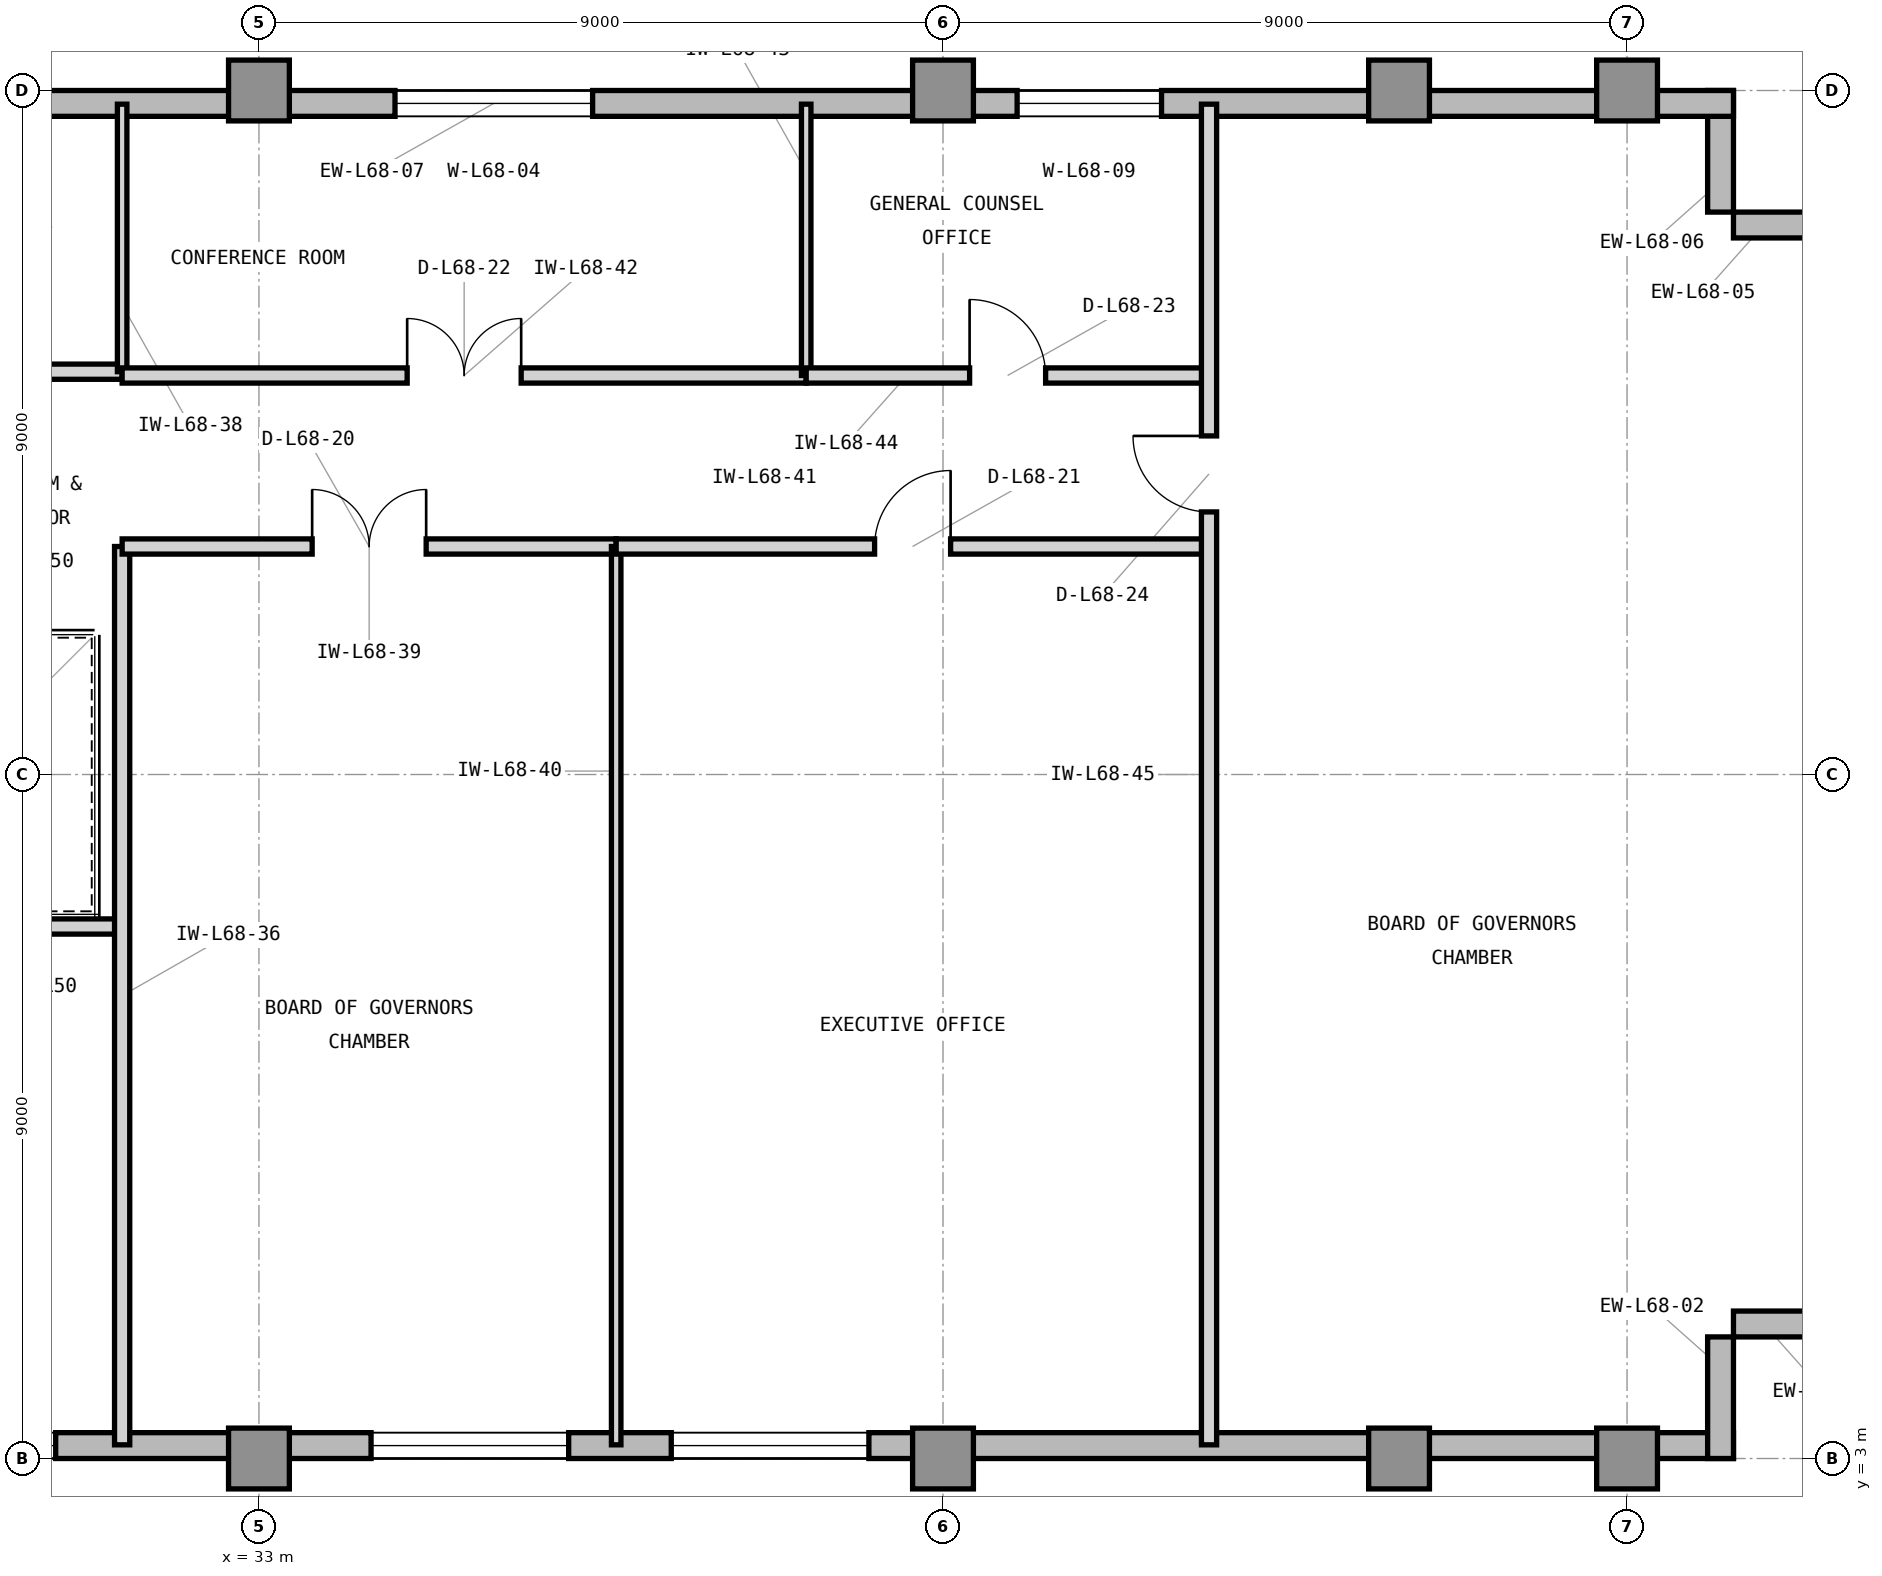
"""IFC4 building model, lengths in metres.
Left out: names, types, materials, properties, quantities, classifications, styles, units other than length and angle.
Written with IfcOpenShell. Run it as: python <this file> out.ifc"""

import sys

from ifc_helpers import new_model, si_unit, direction, frame, frame_2d, origin, origin_2d, place, context, subcontext, project, spatial, rectangle, extrude, element, fill, save


model = new_model("IFC4")
c1 = context("Model", 3, precision=1e-05, world=origin(), true_north=direction((0.0, 1.0)))
c2 = subcontext(c1, "Body", "Model", "MODEL_VIEW")
j1 = project(units=[si_unit("LENGTHUNIT", "METRE"), si_unit("PLANEANGLEUNIT", "RADIAN")], contexts=[c1])
p1 = place(None, origin())
s1 = spatial("IfcSite", under=j1, at=p1, CompositionType="ELEMENT")
p2 = place(p1, origin())
s2 = spatial("IfcBuilding", under=s1, at=p2, CompositionType="ELEMENT")
p3 = place(p2, frame((0.0, 0.0, 278.1)))
s3 = spatial("IfcBuildingStorey", under=s2, at=p3, CompositionType="ELEMENT", Elevation=278.1)
for number, where, z_axis, x_axis in (
    (1, (33.0, 3.0, 0.0), (0.0, 0.0, 1.0), (1.0, 0.0, 0.0)),
    (2, (33.0, 21.0, 0.0), (0.0, 0.0, 1.0), (1.0, 0.0, 0.0)),
    (3, (42.0, 3.0, 0.0), (0.0, 0.0, 1.0), (1.0, 0.0, 0.0)),
    (4, (42.0, 21.0, 0.0), (0.0, 0.0, 1.0), (1.0, 0.0, 0.0)),
    (5, (48.0, 3.0, 0.0), (0.0, 0.0, 1.0), (1.0, 0.0, 0.0)),
    (6, (48.0, 21.0, 0.0), (0.0, 0.0, 1.0), (1.0, 0.0, 0.0)),
    (7, (51.0, 3.0, 0.0), (0.0, 0.0, 1.0), (1.0, 0.0, 0.0)),
    (8, (51.0, 21.0, 0.0), (0.0, 0.0, 1.0), (1.0, 0.0, 0.0)),
):
    element("IfcColumn", number, at=place(p3, frame(where, z_axis=z_axis, x_axis=x_axis)), inside=s3, PredefinedType="COLUMN", context=c2, shape_type="SweptSolid", body=[
        extrude(rectangle(XDim=0.8, YDim=0.8, at=origin_2d()), origin(), (0.0, 0.0, 1.0), 3.9),
    ])
p4 = place(p3, frame((23.9, 3.17, 0.0), z_axis=(0.0, 0.0, 1.0), x_axis=(1.0, 0.0, 0.0)))
e9 = element("IfcWall", 9, at=p4, inside=s3, PredefinedType="STANDARD", context=c2, shape_type="SweptSolid", body=[
    extrude(rectangle(XDim=28.5, YDim=0.34, at=frame_2d((14.25, 0.0))), origin(), (0.0, 0.0, 1.0), 3.715),
])
p5 = place(p4, frame((10.575, 0.0, 0.8)))
e10 = element("IfcOpeningElement", 10, at=p5, cuts=e9, PredefinedType="OPENING", context=c2, shape_type="SweptSolid", body=[
    extrude(rectangle(XDim=2.6, YDim=2.35, at=frame_2d((1.3, 1.175))), frame((0.0, 0.18, 0.0), z_axis=(0.0, -1.0, 0.0), x_axis=(1.0, 0.0, 0.0)), (0.0, 0.0, 1.0), 0.36),
])
p6 = place(p4, frame((1.1, 0.0, 0.8)))
e11 = element("IfcOpeningElement", 11, at=p6, cuts=e9, PredefinedType="OPENING", context=c2, shape_type="SweptSolid", body=[
    extrude(rectangle(XDim=1.2, YDim=2.35, at=frame_2d((0.6, 1.175))), frame((0.0, 0.18, 0.0), z_axis=(0.0, -1.0, 0.0), x_axis=(1.0, 0.0, 0.0)), (0.0, 0.0, 1.0), 0.36),
])
p7 = place(p4, frame((3.826, 0.0, 0.8)))
e12 = element("IfcOpeningElement", 12, at=p7, cuts=e9, PredefinedType="OPENING", context=c2, shape_type="SweptSolid", body=[
    extrude(rectangle(XDim=2.6, YDim=2.35, at=frame_2d((1.3, 1.175))), frame((0.0, 0.18, 0.0), z_axis=(0.0, -1.0, 0.0), x_axis=(1.0, 0.0, 0.0)), (0.0, 0.0, 1.0), 0.36),
])
p8 = place(p4, frame((14.525, 0.0, 0.8)))
e13 = element("IfcOpeningElement", 13, at=p8, cuts=e9, PredefinedType="OPENING", context=c2, shape_type="SweptSolid", body=[
    extrude(rectangle(XDim=2.6, YDim=2.35, at=frame_2d((1.3, 1.175))), frame((0.0, 0.18, 0.0), z_axis=(0.0, -1.0, 0.0), x_axis=(1.0, 0.0, 0.0)), (0.0, 0.0, 1.0), 0.36),
])
for number, where, z_axis, x_axis in (
    (14, (52.23, 3.0, 0.0), (0.0, 0.0, 1.0), (0.0, 1.0, 0.0)),
    (15, (52.4, 4.77, 0.0), (0.0, 0.0, 1.0), (1.0, 0.0, 0.0)),
    (16, (54.0, 19.23, 0.0), (0.0, 0.0, 1.0), (-1.0, 0.0, 0.0)),
    (17, (52.23, 19.4, 0.0), (0.0, 0.0, 1.0), (0.0, 1.0, 0.0)),
):
    element("IfcWall", number, at=place(p3, frame(where, z_axis=z_axis, x_axis=x_axis)), inside=s3, PredefinedType="STANDARD", context=c2, shape_type="SweptSolid", body=[
        extrude(rectangle(XDim=1.6, YDim=0.34, at=frame_2d((0.8, 0.0))), origin(), (0.0, 0.0, 1.0), 3.715),
    ])
p9 = place(p3, frame((52.4, 20.83, 0.0), z_axis=(0.0, 0.0, 1.0), x_axis=(-1.0, 0.0, 0.0)))
e18 = element("IfcWall", 18, at=p9, inside=s3, PredefinedType="STANDARD", context=c2, shape_type="SweptSolid", body=[
    extrude(rectangle(XDim=32.62, YDim=0.34, at=frame_2d((16.31, 0.0))), origin(), (0.0, 0.0, 1.0), 3.715),
])
p10 = place(p9, frame((15.01, 0.0, 0.8)))
e19 = element("IfcOpeningElement", 19, at=p10, cuts=e18, PredefinedType="OPENING", context=c2, shape_type="SweptSolid", body=[
    extrude(rectangle(XDim=2.6, YDim=2.35, at=frame_2d((1.3, 1.175))), frame((0.0, 0.18, 0.0), z_axis=(0.0, -1.0, 0.0), x_axis=(1.0, 0.0, 0.0)), (0.0, 0.0, 1.0), 0.36),
])
p11 = place(p9, frame((24.33, 0.0, 0.8)))
e20 = element("IfcOpeningElement", 20, at=p11, cuts=e18, PredefinedType="OPENING", context=c2, shape_type="SweptSolid", body=[
    extrude(rectangle(XDim=2.6, YDim=2.35, at=frame_2d((1.3, 1.175))), frame((0.0, 0.18, 0.0), z_axis=(0.0, -1.0, 0.0), x_axis=(1.0, 0.0, 0.0)), (0.0, 0.0, 1.0), 0.36),
])
p12 = place(p9, frame((7.525, 0.0, 0.8)))
e21 = element("IfcOpeningElement", 21, at=p12, cuts=e18, PredefinedType="OPENING", context=c2, shape_type="SweptSolid", body=[
    extrude(rectangle(XDim=1.9, YDim=2.35, at=frame_2d((0.95, 1.175))), frame((0.0, 0.18, 0.0), z_axis=(0.0, -1.0, 0.0), x_axis=(1.0, 0.0, 0.0)), (0.0, 0.0, 1.0), 0.36),
])
p13 = place(p3, frame((26.9, 10.0, 0.0), z_axis=(0.0, 0.0, 1.0), x_axis=(1.0, 0.0, 0.0)))
e22 = element("IfcWall", 22, at=p13, inside=s3, PredefinedType="PARTITIONING", context=c2, shape_type="SweptSolid", body=[
    extrude(rectangle(XDim=4.3, YDim=0.2, at=frame_2d((2.15, 0.0))), origin(), (0.0, 0.0, 1.0), 3.705),
])
p14 = place(p3, frame((31.2, 3.18, 0.0), z_axis=(0.0, 0.0, 1.0), x_axis=(0.0, 1.0, 0.0)))
e23 = element("IfcWall", 23, at=p14, inside=s3, PredefinedType="PARTITIONING", context=c2, shape_type="SweptSolid", body=[
    extrude(rectangle(XDim=11.82, YDim=0.2, at=frame_2d((5.91, 0.0))), origin(), (0.0, 0.0, 1.0), 3.705),
])
p15 = place(p3, frame((23.85, 17.3, 0.0), z_axis=(0.0, 0.0, 1.0), x_axis=(1.0, 0.0, 0.0)))
e24 = element("IfcWall", 24, at=p15, inside=s3, PredefinedType="PARTITIONING", context=c2, shape_type="SweptSolid", body=[
    extrude(rectangle(XDim=7.35, YDim=0.2, at=frame_2d((3.675, 0.0))), origin(), (0.0, 0.0, 1.0), 3.705),
])
p16 = place(p15, frame((2.8, 0.0, 0.0)))
e25 = element("IfcOpeningElement", 25, at=p16, cuts=e24, PredefinedType="OPENING", context=c2, shape_type="SweptSolid", body=[
    extrude(rectangle(XDim=1.0, YDim=2.15, at=frame_2d((0.5, 1.075))), frame((0.0, 0.11, 0.0), z_axis=(0.0, -1.0, 0.0), x_axis=(1.0, 0.0, 0.0)), (0.0, 0.0, 1.0), 0.22),
])
p17 = place(p3, frame((31.2, 17.3, 0.0), z_axis=(0.0, 0.0, 1.0), x_axis=(0.0, 1.0, 0.0)))
e26 = element("IfcWall", 26, at=p17, inside=s3, PredefinedType="PARTITIONING", context=c2, shape_type="SweptSolid", body=[
    extrude(rectangle(XDim=3.52, YDim=0.125, at=frame_2d((1.76, 0.0))), origin(), (0.0, 0.0, 1.0), 3.705),
])
p18 = place(p3, frame((31.2, 15.0, 0.0), z_axis=(0.0, 0.0, 1.0), x_axis=(1.0, 0.0, 0.0)))
e27 = element("IfcWall", 27, at=p18, inside=s3, PredefinedType="PARTITIONING", context=c2, shape_type="SweptSolid", body=[
    extrude(rectangle(XDim=6.5, YDim=0.2, at=frame_2d((3.25, 0.0))), origin(), (0.0, 0.0, 1.0), 3.301),
])
p19 = place(p18, frame((2.5, 0.0, 0.0)))
e28 = element("IfcOpeningElement", 28, at=p19, cuts=e27, PredefinedType="OPENING", context=c2, shape_type="SweptSolid", body=[
    extrude(rectangle(XDim=1.5, YDim=2.3, at=frame_2d((0.75, 1.15))), frame((0.0, 0.11, 0.0), z_axis=(0.0, -1.0, 0.0), x_axis=(1.0, 0.0, 0.0)), (0.0, 0.0, 1.0), 0.22),
])
p20 = place(p3, frame((37.7, 3.18, 0.0), z_axis=(0.0, 0.0, 1.0), x_axis=(0.0, 1.0, 0.0)))
e29 = element("IfcWall", 29, at=p20, inside=s3, PredefinedType="PARTITIONING", context=c2, shape_type="SweptSolid", body=[
    extrude(rectangle(XDim=11.82, YDim=0.125, at=frame_2d((5.91, 0.0))), origin(), (0.0, 0.0, 1.0), 3.705),
])
p21 = place(p3, frame((37.7, 15.0, 0.0), z_axis=(0.0, 0.0, 1.0), x_axis=(1.0, 0.0, 0.0)))
e30 = element("IfcWall", 30, at=p21, inside=s3, PredefinedType="PARTITIONING", context=c2, shape_type="SweptSolid", body=[
    extrude(rectangle(XDim=7.8, YDim=0.2, at=frame_2d((3.9, 0.0))), origin(), (0.0, 0.0, 1.0), 3.301),
])
p22 = place(p21, frame((3.4, 0.0, 0.0)))
e31 = element("IfcOpeningElement", 31, at=p22, cuts=e30, PredefinedType="OPENING", context=c2, shape_type="SweptSolid", body=[
    extrude(rectangle(XDim=1.0, YDim=2.15, at=frame_2d((0.5, 1.075))), frame((0.0, 0.11, 0.0), z_axis=(0.0, -1.0, 0.0), x_axis=(1.0, 0.0, 0.0)), (0.0, 0.0, 1.0), 0.22),
])
p23 = place(p3, frame((31.2, 17.25, 0.0), z_axis=(0.0, 0.0, 1.0), x_axis=(1.0, 0.0, 0.0)))
e32 = element("IfcWall", 32, at=p23, inside=s3, PredefinedType="PARTITIONING", context=c2, shape_type="SweptSolid", body=[
    extrude(rectangle(XDim=9.0, YDim=0.2, at=frame_2d((4.5, 0.0))), origin(), (0.0, 0.0, 1.0), 3.705),
])
p24 = place(p23, frame((3.75, 0.0, 0.0)))
e33 = element("IfcOpeningElement", 33, at=p24, cuts=e32, PredefinedType="OPENING", context=c2, shape_type="SweptSolid", body=[
    extrude(rectangle(XDim=1.5, YDim=2.3, at=frame_2d((0.75, 1.15))), frame((0.0, 0.11, 0.0), z_axis=(0.0, -1.0, 0.0), x_axis=(1.0, 0.0, 0.0)), (0.0, 0.0, 1.0), 0.22),
])
p25 = place(p3, frame((40.2, 17.25, 0.0), z_axis=(0.0, 0.0, 1.0), x_axis=(0.0, 1.0, 0.0)))
e34 = element("IfcWall", 34, at=p25, inside=s3, PredefinedType="PARTITIONING", context=c2, shape_type="SweptSolid", body=[
    extrude(rectangle(XDim=3.57, YDim=0.125, at=frame_2d((1.785, 0.0))), origin(), (0.0, 0.0, 1.0), 3.705),
])
p26 = place(p3, frame((40.2, 17.25, 0.0), z_axis=(0.0, 0.0, 1.0), x_axis=(1.0, 0.0, 0.0)))
e35 = element("IfcWall", 35, at=p26, inside=s3, PredefinedType="PARTITIONING", context=c2, shape_type="SweptSolid", body=[
    extrude(rectangle(XDim=5.3, YDim=0.2, at=frame_2d((2.65, 0.0))), origin(), (0.0, 0.0, 1.0), 3.705),
])
p27 = place(p26, frame((2.15, 0.0, 0.0)))
e36 = element("IfcOpeningElement", 36, at=p27, cuts=e35, PredefinedType="OPENING", context=c2, shape_type="SweptSolid", body=[
    extrude(rectangle(XDim=1.0, YDim=2.15, at=frame_2d((0.5, 1.075))), frame((0.0, 0.11, 0.0), z_axis=(0.0, -1.0, 0.0), x_axis=(1.0, 0.0, 0.0)), (0.0, 0.0, 1.0), 0.22),
])
p28 = place(p3, frame((45.5, 3.18, 0.0), z_axis=(0.0, 0.0, 1.0), x_axis=(0.0, 1.0, 0.0)))
e37 = element("IfcWall", 37, at=p28, inside=s3, PredefinedType="PARTITIONING", context=c2, shape_type="SweptSolid", body=[
    extrude(rectangle(XDim=17.64, YDim=0.2, at=frame_2d((8.82, 0.0))), origin(), (0.0, 0.0, 1.0), 3.705),
])
p29 = place(p28, frame((12.275, 0.0, 0.0)))
e38 = element("IfcOpeningElement", 38, at=p29, cuts=e37, PredefinedType="OPENING", context=c2, shape_type="SweptSolid", body=[
    extrude(rectangle(XDim=1.0, YDim=2.15, at=frame_2d((0.5, 1.075))), frame((0.0, 0.11, 0.0), z_axis=(0.0, -1.0, 0.0), x_axis=(1.0, 0.0, 0.0)), (0.0, 0.0, 1.0), 0.22),
])
p30 = place(p5, origin())
e39 = element("IfcWindow", 39, at=p30, inside=s3, PartitioningType="SINGLE_PANEL", PredefinedType="WINDOW", context=c2, shape_type="SweptSolid", body=[
    extrude(rectangle(XDim=2.6, YDim=2.35, at=frame_2d((1.3, 1.175))), frame((0.0, 0.11, 0.0), z_axis=(0.0, -1.0, 0.0), x_axis=(1.0, 0.0, 0.0)), (0.0, 0.0, 1.0), 0.06),
])
fill(e10, e39)
p31 = place(p10, origin())
e40 = element("IfcWindow", 40, at=p31, inside=s3, PartitioningType="SINGLE_PANEL", PredefinedType="WINDOW", context=c2, shape_type="SweptSolid", body=[
    extrude(rectangle(XDim=2.6, YDim=2.35, at=frame_2d((1.3, 1.175))), frame((0.0, 0.11, 0.0), z_axis=(0.0, -1.0, 0.0), x_axis=(1.0, 0.0, 0.0)), (0.0, 0.0, 1.0), 0.06),
])
fill(e19, e40)
p32 = place(p19, origin())
e41 = element("IfcDoor", 41, at=p32, inside=s3, OperationType="DOUBLE_DOOR_SINGLE_SWING", PredefinedType="DOOR", context=c2, shape_type="SweptSolid", body=[
    extrude(rectangle(XDim=1.5, YDim=2.3, at=frame_2d((0.75, 1.15))), frame((0.0, 0.025, 0.0), z_axis=(0.0, -1.0, 0.0), x_axis=(1.0, 0.0, 0.0)), (0.0, 0.0, 1.0), 0.05),
])
fill(e28, e41)
p33 = place(p22, origin())
e42 = element("IfcDoor", 42, at=p33, inside=s3, OperationType="SINGLE_SWING_RIGHT", PredefinedType="DOOR", context=c2, shape_type="SweptSolid", body=[
    extrude(rectangle(XDim=1.0, YDim=2.15, at=frame_2d((0.5, 1.075))), frame((0.0, 0.025, 0.0), z_axis=(0.0, -1.0, 0.0), x_axis=(1.0, 0.0, 0.0)), (0.0, 0.0, 1.0), 0.05),
])
fill(e31, e42)
p34 = place(p24, origin())
e43 = element("IfcDoor", 43, at=p34, inside=s3, OperationType="DOUBLE_DOOR_SINGLE_SWING", PredefinedType="DOOR", context=c2, shape_type="SweptSolid", body=[
    extrude(rectangle(XDim=1.5, YDim=2.3, at=frame_2d((0.75, 1.15))), frame((0.0, 0.025, 0.0), z_axis=(0.0, -1.0, 0.0), x_axis=(1.0, 0.0, 0.0)), (0.0, 0.0, 1.0), 0.05),
])
fill(e33, e43)
p35 = place(p27, origin())
e44 = element("IfcDoor", 44, at=p35, inside=s3, OperationType="SINGLE_SWING_LEFT", PredefinedType="DOOR", context=c2, shape_type="SweptSolid", body=[
    extrude(rectangle(XDim=1.0, YDim=2.15, at=frame_2d((0.5, 1.075))), frame((0.0, 0.025, 0.0), z_axis=(0.0, -1.0, 0.0), x_axis=(1.0, 0.0, 0.0)), (0.0, 0.0, 1.0), 0.05),
])
fill(e36, e44)
p36 = place(p29, origin())
e45 = element("IfcDoor", 45, at=p36, inside=s3, OperationType="SINGLE_SWING_RIGHT", PredefinedType="DOOR", context=c2, shape_type="SweptSolid", body=[
    extrude(rectangle(XDim=1.0, YDim=2.15, at=frame_2d((0.5, 1.075))), frame((0.0, 0.025, 0.0), z_axis=(0.0, -1.0, 0.0), x_axis=(1.0, 0.0, 0.0)), (0.0, 0.0, 1.0), 0.05),
])
fill(e38, e45)
p37 = place(p7, origin())
e46 = element("IfcWindow", 46, at=p37, inside=s3, PartitioningType="SINGLE_PANEL", PredefinedType="WINDOW", context=c2, shape_type="SweptSolid", body=[
    extrude(rectangle(XDim=2.6, YDim=2.35, at=frame_2d((1.3, 1.175))), frame((0.0, 0.11, 0.0), z_axis=(0.0, -1.0, 0.0), x_axis=(1.0, 0.0, 0.0)), (0.0, 0.0, 1.0), 0.06),
])
fill(e12, e46)
p38 = place(p8, origin())
e47 = element("IfcWindow", 47, at=p38, inside=s3, PartitioningType="SINGLE_PANEL", PredefinedType="WINDOW", context=c2, shape_type="SweptSolid", body=[
    extrude(rectangle(XDim=2.6, YDim=2.35, at=frame_2d((1.3, 1.175))), frame((0.0, 0.11, 0.0), z_axis=(0.0, -1.0, 0.0), x_axis=(1.0, 0.0, 0.0)), (0.0, 0.0, 1.0), 0.06),
])
fill(e13, e47)
p39 = place(p12, origin())
e48 = element("IfcWindow", 48, at=p39, inside=s3, PartitioningType="SINGLE_PANEL", PredefinedType="WINDOW", context=c2, shape_type="SweptSolid", body=[
    extrude(rectangle(XDim=1.9, YDim=2.35, at=frame_2d((0.95, 1.175))), frame((0.0, 0.11, 0.0), z_axis=(0.0, -1.0, 0.0), x_axis=(1.0, 0.0, 0.0)), (0.0, 0.0, 1.0), 0.06),
])
fill(e21, e48)
save(model, sys.argv[1])
